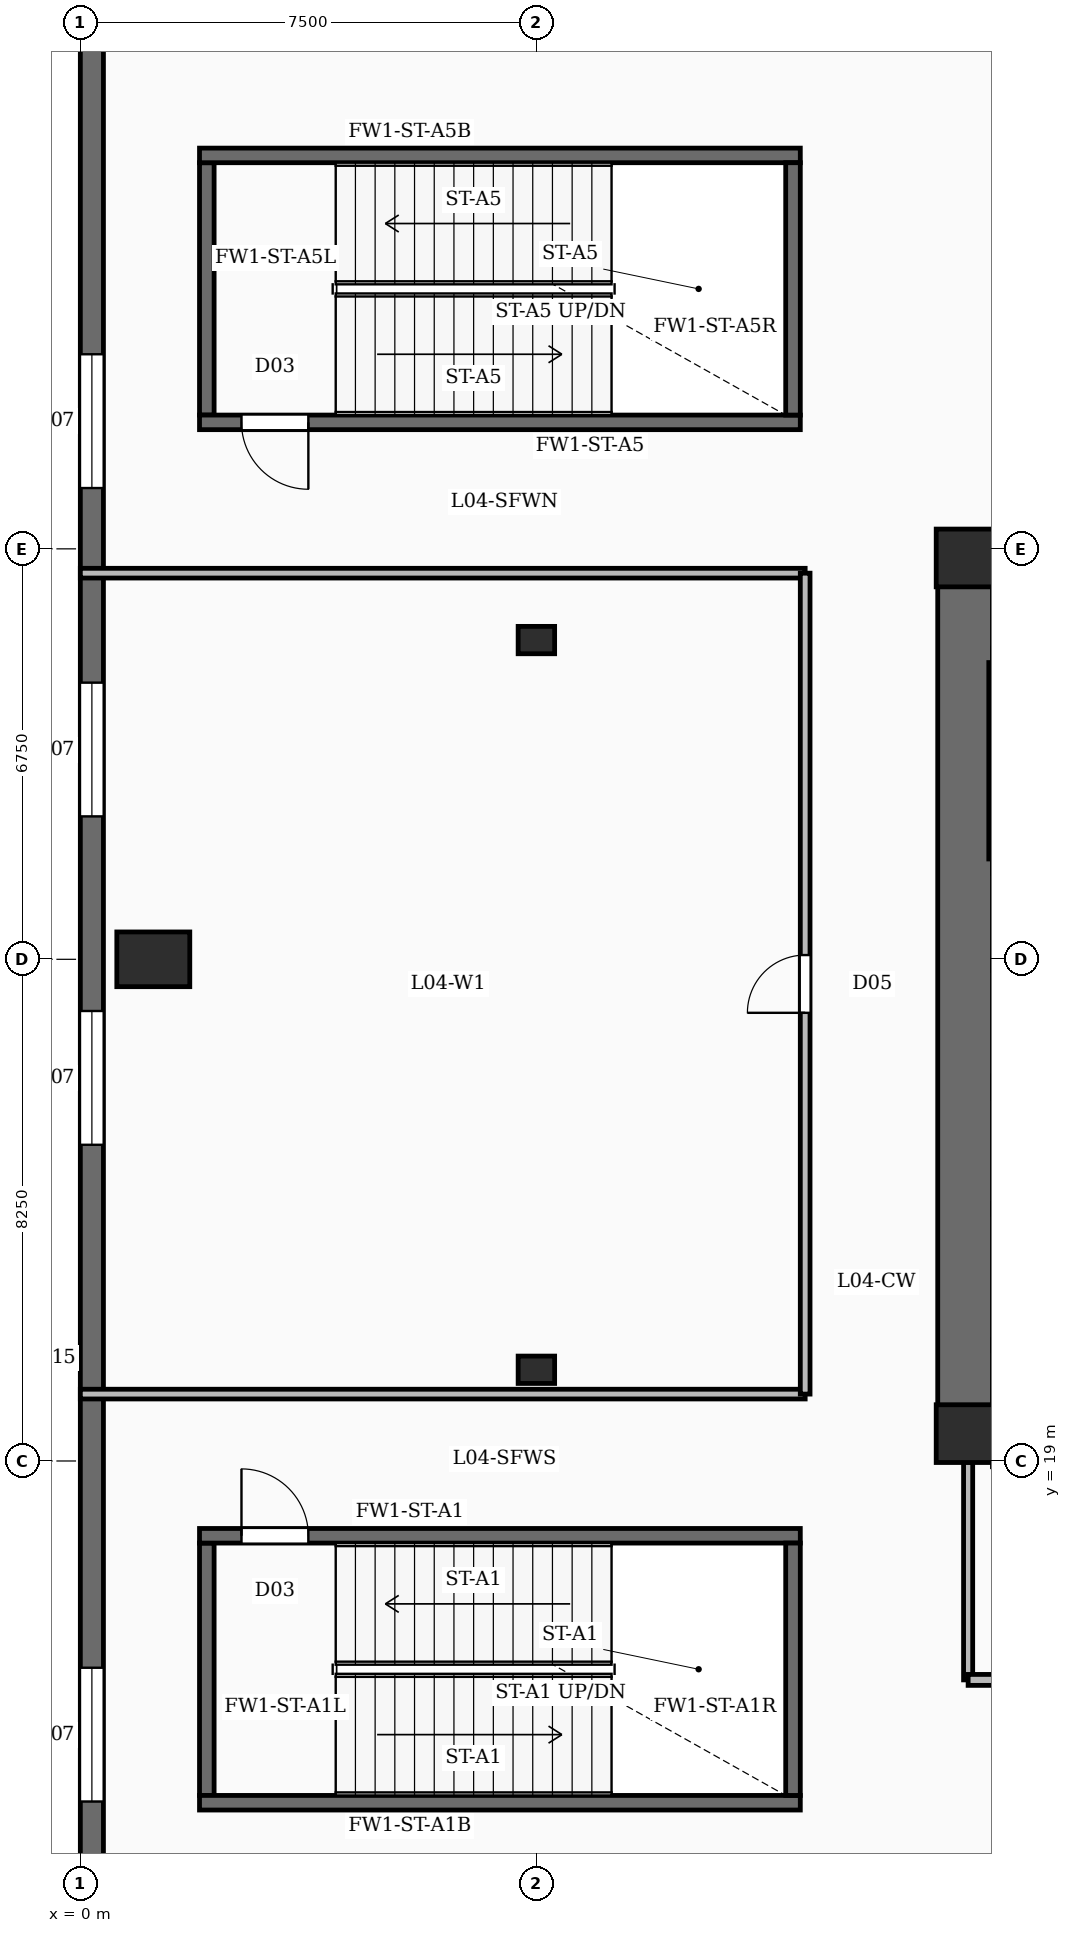
"""IFC4 building model, lengths in metres.
Left out: names, types, materials, properties, quantities, classifications, styles, units other than length and angle.
Written with IfcOpenShell. Run it as: python <this file> out.ifc"""

import sys

from ifc_helpers import new_model, si_unit, direction, frame, frame_2d, origin, origin_2d, place, context, subcontext, project, spatial, rectangle, extrude, element, fill, save


model = new_model("IFC4")
c1 = context("Model", 3, precision=1e-05, world=origin(), true_north=direction((0.0, 1.0)))
c2 = subcontext(c1, "Body", "Model", "MODEL_VIEW")
j1 = project(units=[si_unit("LENGTHUNIT", "METRE"), si_unit("PLANEANGLEUNIT", "RADIAN")], contexts=[c1])
p1 = place(None, origin())
s1 = spatial("IfcSite", under=j1, at=p1, CompositionType="ELEMENT")
p2 = place(p1, origin())
s2 = spatial("IfcBuilding", under=s1, at=p2, CompositionType="ELEMENT")
p3 = place(p2, frame((0.0, 0.0, 23.0)))
s3 = spatial("IfcBuildingStorey", under=s2, at=p3, CompositionType="ELEMENT", Elevation=23.0)
p4 = place(p3, frame((14.55, 19.0, -0.35), z_axis=(0.0, 0.0, 1.0), x_axis=(0.0, 1.0, 0.0)))
e1 = element("IfcWall", 1, at=p4, inside=s3, PredefinedType="SHEAR", context=c2, shape_type="SweptSolid", body=[
    extrude(rectangle(XDim=15.3, YDim=0.9, at=frame_2d((7.65, 0.0))), origin(), (0.0, 0.0, 1.0), 5.0),
])
for number, where, z_axis, x_axis in (
    (2, (14.55, 19.45, -0.35), (0.0, 0.0, 1.0), (1.0, 0.0, 0.0)),
    (3, (14.55, 33.85, -0.35), (0.0, 0.0, 1.0), (1.0, 0.0, 0.0)),
):
    element("IfcColumn", number, at=place(p3, frame(where, z_axis=z_axis, x_axis=x_axis)), inside=s3, PredefinedType="COLUMN", context=c2, shape_type="SweptSolid", body=[
        extrude(rectangle(XDim=0.95, YDim=0.95, at=origin_2d()), origin(), (0.0, 0.0, 1.0), 5.0),
    ])
p5 = place(p3, frame((1.2, 27.25, -0.35), z_axis=(0.0, 0.0, 1.0), x_axis=(1.0, 0.0, 0.0)))
e4 = element("IfcColumn", 4, at=p5, inside=s3, PredefinedType="COLUMN", context=c2, shape_type="SweptSolid", body=[
    extrude(rectangle(XDim=1.2, YDim=0.9, at=origin_2d()), origin(), (0.0, 0.0, 1.0), 5.0),
])
for number, where, z_axis, x_axis in (
    (5, (7.5, 20.5, -0.35), (0.0, 0.0, 1.0), (1.0, 0.0, 0.0)),
    (6, (7.5, 32.5, -0.35), (0.0, 0.0, 1.0), (1.0, 0.0, 0.0)),
):
    element("IfcColumn", number, at=place(p3, frame(where, z_axis=z_axis, x_axis=x_axis)), inside=s3, PredefinedType="PILASTER", context=c2, shape_type="SweptSolid", body=[
        extrude(rectangle(XDim=0.6, YDim=0.45, at=origin_2d()), origin(), (0.0, 0.0, 1.0), 5.0),
    ])
p6 = place(p3, frame((0.19, 5.4, 0.0), z_axis=(0.0, 0.0, 1.0), x_axis=(0.0, 1.0, 0.0)))
e7 = element("IfcWall", 7, at=p6, inside=s3, PredefinedType="SOLIDWALL", context=c2, shape_type="SweptSolid", body=[
    extrude(rectangle(XDim=43.7, YDim=0.38, at=frame_2d((21.85, 0.0))), origin(), (0.0, 0.0, 1.0), 4.65),
])
p7 = place(p6, frame((2.6, 0.0, 0.95)))
e8 = element("IfcOpeningElement", 8, at=p7, cuts=e7, PredefinedType="OPENING", context=c2, shape_type="SweptSolid", body=[
    extrude(rectangle(XDim=2.2, YDim=2.5, at=frame_2d((1.1, 1.25))), frame((0.0, 0.2, 0.0), z_axis=(0.0, -1.0, 0.0), x_axis=(1.0, 0.0, 0.0)), (0.0, 0.0, 1.0), 0.4),
])
p8 = place(p6, frame((8.0, 0.0, 0.95)))
e9 = element("IfcOpeningElement", 9, at=p8, cuts=e7, PredefinedType="OPENING", context=c2, shape_type="SweptSolid", body=[
    extrude(rectangle(XDim=2.2, YDim=2.5, at=frame_2d((1.1, 1.25))), frame((0.0, 0.2, 0.0), z_axis=(0.0, -1.0, 0.0), x_axis=(1.0, 0.0, 0.0)), (0.0, 0.0, 1.0), 0.4),
])
p9 = place(p6, frame((18.8, 0.0, 0.95)))
e10 = element("IfcOpeningElement", 10, at=p9, cuts=e7, PredefinedType="OPENING", context=c2, shape_type="SweptSolid", body=[
    extrude(rectangle(XDim=2.2, YDim=2.5, at=frame_2d((1.1, 1.25))), frame((0.0, 0.2, 0.0), z_axis=(0.0, -1.0, 0.0), x_axis=(1.0, 0.0, 0.0)), (0.0, 0.0, 1.0), 0.4),
])
p10 = place(p6, frame((24.2, 0.0, 0.95)))
e11 = element("IfcOpeningElement", 11, at=p10, cuts=e7, PredefinedType="OPENING", context=c2, shape_type="SweptSolid", body=[
    extrude(rectangle(XDim=2.2, YDim=2.5, at=frame_2d((1.1, 1.25))), frame((0.0, 0.2, 0.0), z_axis=(0.0, -1.0, 0.0), x_axis=(1.0, 0.0, 0.0)), (0.0, 0.0, 1.0), 0.4),
])
p11 = place(p6, frame((29.6, 0.0, 0.95)))
e12 = element("IfcOpeningElement", 12, at=p11, cuts=e7, PredefinedType="OPENING", context=c2, shape_type="SweptSolid", body=[
    extrude(rectangle(XDim=2.2, YDim=2.5, at=frame_2d((1.1, 1.25))), frame((0.0, 0.2, 0.0), z_axis=(0.0, -1.0, 0.0), x_axis=(1.0, 0.0, 0.0)), (0.0, 0.0, 1.0), 0.4),
])
p12 = place(p3, frame((1.96, 17.77, 0.0), z_axis=(0.0, 0.0, 1.0), x_axis=(1.0, 0.0, 0.0)))
e13 = element("IfcWall", 13, at=p12, inside=s3, PredefinedType="SOLIDWALL", context=c2, shape_type="SweptSolid", body=[
    extrude(rectangle(XDim=9.88, YDim=0.24, at=frame_2d((4.94, 0.0))), origin(), (0.0, 0.0, 1.0), 4.65),
])
p13 = place(p12, frame((0.69, 0.0, 0.0)))
e14 = element("IfcOpeningElement", 14, at=p13, cuts=e13, PredefinedType="OPENING", context=c2, shape_type="SweptSolid", body=[
    extrude(rectangle(XDim=1.1, YDim=2.15, at=frame_2d((0.55, 1.075))), frame((0.0, 0.13, 0.0), z_axis=(0.0, -1.0, 0.0), x_axis=(1.0, 0.0, 0.0)), (0.0, 0.0, 1.0), 0.26),
])
p14 = place(p3, frame((1.96, 13.38, 0.0), z_axis=(0.0, 0.0, 1.0), x_axis=(1.0, 0.0, 0.0)))
e15 = element("IfcWall", 15, at=p14, inside=s3, PredefinedType="SOLIDWALL", context=c2, shape_type="SweptSolid", body=[
    extrude(rectangle(XDim=9.88, YDim=0.24, at=frame_2d((4.94, 0.0))), origin(), (0.0, 0.0, 1.0), 4.65),
])
for number, where, z_axis, x_axis in (
    (16, (2.08, 13.5, 0.0), (0.0, 0.0, 1.0), (0.0, 1.0, 0.0)),
    (17, (11.72, 13.5, 0.0), (0.0, 0.0, 1.0), (0.0, 1.0, 0.0)),
):
    element("IfcWall", number, at=place(p3, frame(where, z_axis=z_axis, x_axis=x_axis)), inside=s3, PredefinedType="SOLIDWALL", context=c2, shape_type="SweptSolid", body=[
        extrude(rectangle(XDim=4.15, YDim=0.24, at=frame_2d((2.075, 0.0))), origin(), (0.0, 0.0, 1.0), 4.65),
    ])
p15 = place(p3, frame((11.84, 36.08, 0.0), z_axis=(0.0, 0.0, 1.0), x_axis=(-1.0, 0.0, 0.0)))
e18 = element("IfcWall", 18, at=p15, inside=s3, PredefinedType="SOLIDWALL", context=c2, shape_type="SweptSolid", body=[
    extrude(rectangle(XDim=9.88, YDim=0.24, at=frame_2d((4.94, 0.0))), origin(), (0.0, 0.0, 1.0), 4.65),
])
p16 = place(p15, frame((8.09, 0.0, 0.0)))
e19 = element("IfcOpeningElement", 19, at=p16, cuts=e18, PredefinedType="OPENING", context=c2, shape_type="SweptSolid", body=[
    extrude(rectangle(XDim=1.1, YDim=2.15, at=frame_2d((0.55, 1.075))), frame((0.0, 0.13, 0.0), z_axis=(0.0, -1.0, 0.0), x_axis=(1.0, 0.0, 0.0)), (0.0, 0.0, 1.0), 0.26),
])
p17 = place(p3, frame((1.96, 40.47, 0.0), z_axis=(0.0, 0.0, 1.0), x_axis=(1.0, 0.0, 0.0)))
e20 = element("IfcWall", 20, at=p17, inside=s3, PredefinedType="SOLIDWALL", context=c2, shape_type="SweptSolid", body=[
    extrude(rectangle(XDim=9.88, YDim=0.24, at=frame_2d((4.94, 0.0))), origin(), (0.0, 0.0, 1.0), 4.65),
])
for number, where, z_axis, x_axis in (
    (21, (2.08, 36.2, 0.0), (0.0, 0.0, 1.0), (0.0, 1.0, 0.0)),
    (22, (11.72, 36.2, 0.0), (0.0, 0.0, 1.0), (0.0, 1.0, 0.0)),
):
    element("IfcWall", number, at=place(p3, frame(where, z_axis=z_axis, x_axis=x_axis)), inside=s3, PredefinedType="SOLIDWALL", context=c2, shape_type="SweptSolid", body=[
        extrude(rectangle(XDim=4.15, YDim=0.24, at=frame_2d((2.075, 0.0))), origin(), (0.0, 0.0, 1.0), 4.65),
    ])
p18 = place(p3, frame((15.06, 28.9, 0.0), z_axis=(0.0, 0.0, 1.0), x_axis=(0.0, 1.0, 0.0)))
e23 = element("IfcWall", 23, at=p18, inside=s3, PredefinedType="SOLIDWALL", context=c2, shape_type="SweptSolid", body=[
    extrude(rectangle(XDim=3.23, YDim=0.24, at=frame_2d((1.615, 0.0))), origin(), (0.0, 0.0, 1.0), 4.65),
])
p19 = place(p3, frame((14.6, 15.4, 0.0), z_axis=(0.0, 0.0, 1.0), x_axis=(1.0, 0.0, 0.0)))
e24 = element("IfcWall", 24, at=p19, inside=s3, PredefinedType="PARTITIONING", context=c2, shape_type="SweptSolid", body=[
    extrude(rectangle(XDim=9.9, YDim=0.18, at=frame_2d((4.95, 0.0))), origin(), (0.0, 0.0, 1.0), 3.71),
])
p20 = place(p19, frame((1.99, 0.0, 0.0)))
e25 = element("IfcOpeningElement", 25, at=p20, cuts=e24, PredefinedType="OPENING", context=c2, shape_type="SweptSolid", body=[
    extrude(rectangle(XDim=0.92, YDim=2.1, at=frame_2d((0.46, 1.05))), frame((0.0, 0.1, 0.0), z_axis=(0.0, -1.0, 0.0), x_axis=(1.0, 0.0, 0.0)), (0.0, 0.0, 1.0), 0.2),
])
p21 = place(p19, frame((6.94, 0.0, 0.0)))
e26 = element("IfcOpeningElement", 26, at=p21, cuts=e24, PredefinedType="OPENING", context=c2, shape_type="SweptSolid", body=[
    extrude(rectangle(XDim=0.92, YDim=2.1, at=frame_2d((0.46, 1.05))), frame((0.0, 0.1, 0.0), z_axis=(0.0, -1.0, 0.0), x_axis=(1.0, 0.0, 0.0)), (0.0, 0.0, 1.0), 0.2),
])
p22 = place(p3, frame((14.6, 15.4, 0.0), z_axis=(0.0, 0.0, 1.0), x_axis=(0.0, 1.0, 0.0)))
e27 = element("IfcWall", 27, at=p22, inside=s3, PredefinedType="PARTITIONING", context=c2, shape_type="SweptSolid", body=[
    extrude(rectangle(XDim=3.58, YDim=0.15, at=frame_2d((1.79, 0.0))), origin(), (0.0, 0.0, 1.0), 3.71),
])
p23 = place(p3, frame((11.92, 20.1, 0.0), z_axis=(0.0, 0.0, 1.0), x_axis=(0.0, 1.0, 0.0)))
e28 = element("IfcWall", 28, at=p23, inside=s3, PredefinedType="PARTITIONING", context=c2, shape_type="SweptSolid", body=[
    extrude(rectangle(XDim=13.5, YDim=0.16, at=frame_2d((6.75, 0.0))), origin(), (0.0, 0.0, 1.0), 3.71),
])
p24 = place(p23, frame((6.27, 0.0, 0.0)))
e29 = element("IfcOpeningElement", 29, at=p24, cuts=e28, PredefinedType="OPENING", context=c2, shape_type="SweptSolid", body=[
    extrude(rectangle(XDim=0.95, YDim=2.15, at=frame_2d((0.475, 1.075))), frame((0.0, 0.09, 0.0), z_axis=(0.0, -1.0, 0.0), x_axis=(1.0, 0.0, 0.0)), (0.0, 0.0, 1.0), 0.18),
])
for number, where, z_axis, x_axis in (
    (30, (0.0, 20.1, 0.0), (0.0, 0.0, 1.0), (1.0, 0.0, 0.0)),
    (31, (0.0, 33.6, 0.0), (0.0, 0.0, 1.0), (1.0, 0.0, 0.0)),
):
    element("IfcWall", number, at=place(p3, frame(where, z_axis=z_axis, x_axis=x_axis)), inside=s3, PredefinedType="PARTITIONING", context=c2, shape_type="SweptSolid", body=[
        extrude(rectangle(XDim=11.92, YDim=0.16, at=frame_2d((5.96, 0.0))), origin(), (0.0, 0.0, 1.0), 3.71),
    ])
p25 = place(p8, origin())
e32 = element("IfcWindow", 32, at=p25, inside=s3, PartitioningType="DOUBLE_PANEL_VERTICAL", PredefinedType="WINDOW", context=c2, shape_type="SweptSolid", body=[
    extrude(rectangle(XDim=2.2, YDim=2.5, at=frame_2d((1.1, 1.25))), frame((0.0, 0.03, 0.0), z_axis=(0.0, -1.0, 0.0), x_axis=(1.0, 0.0, 0.0)), (0.0, 0.0, 1.0), 0.06),
])
fill(e9, e32)
p26 = place(p9, origin())
e33 = element("IfcWindow", 33, at=p26, inside=s3, PartitioningType="DOUBLE_PANEL_VERTICAL", PredefinedType="WINDOW", context=c2, shape_type="SweptSolid", body=[
    extrude(rectangle(XDim=2.2, YDim=2.5, at=frame_2d((1.1, 1.25))), frame((0.0, 0.03, 0.0), z_axis=(0.0, -1.0, 0.0), x_axis=(1.0, 0.0, 0.0)), (0.0, 0.0, 1.0), 0.06),
])
fill(e10, e33)
p27 = place(p10, origin())
e34 = element("IfcWindow", 34, at=p27, inside=s3, PartitioningType="DOUBLE_PANEL_VERTICAL", PredefinedType="WINDOW", context=c2, shape_type="SweptSolid", body=[
    extrude(rectangle(XDim=2.2, YDim=2.5, at=frame_2d((1.1, 1.25))), frame((0.0, 0.03, 0.0), z_axis=(0.0, -1.0, 0.0), x_axis=(1.0, 0.0, 0.0)), (0.0, 0.0, 1.0), 0.06),
])
fill(e11, e34)
p28 = place(p11, origin())
e35 = element("IfcWindow", 35, at=p28, inside=s3, PartitioningType="DOUBLE_PANEL_VERTICAL", PredefinedType="WINDOW", context=c2, shape_type="SweptSolid", body=[
    extrude(rectangle(XDim=2.2, YDim=2.5, at=frame_2d((1.1, 1.25))), frame((0.0, 0.03, 0.0), z_axis=(0.0, -1.0, 0.0), x_axis=(1.0, 0.0, 0.0)), (0.0, 0.0, 1.0), 0.06),
])
fill(e12, e35)
p29 = place(p13, origin())
e36 = element("IfcDoor", 36, at=p29, inside=s3, OperationType="SINGLE_SWING_LEFT", PredefinedType="DOOR", context=c2, shape_type="SweptSolid", body=[
    extrude(rectangle(XDim=1.1, YDim=2.15, at=frame_2d((0.55, 1.075))), frame((0.0, 0.025, 0.0), z_axis=(0.0, -1.0, 0.0), x_axis=(1.0, 0.0, 0.0)), (0.0, 0.0, 1.0), 0.05),
])
fill(e14, e36)
p30 = place(p16, origin())
e37 = element("IfcDoor", 37, at=p30, inside=s3, OperationType="SINGLE_SWING_LEFT", PredefinedType="DOOR", context=c2, shape_type="SweptSolid", body=[
    extrude(rectangle(XDim=1.1, YDim=2.15, at=frame_2d((0.55, 1.075))), frame((0.0, 0.025, 0.0), z_axis=(0.0, -1.0, 0.0), x_axis=(1.0, 0.0, 0.0)), (0.0, 0.0, 1.0), 0.05),
])
fill(e19, e37)
p31 = place(p24, origin())
e38 = element("IfcDoor", 38, at=p31, inside=s3, OperationType="SINGLE_SWING_LEFT", PredefinedType="DOOR", context=c2, shape_type="SweptSolid", body=[
    extrude(rectangle(XDim=0.95, YDim=2.15, at=frame_2d((0.475, 1.075))), frame((0.0, 0.025, 0.0), z_axis=(0.0, -1.0, 0.0), x_axis=(1.0, 0.0, 0.0)), (0.0, 0.0, 1.0), 0.05),
])
fill(e29, e38)
save(model, sys.argv[1])
